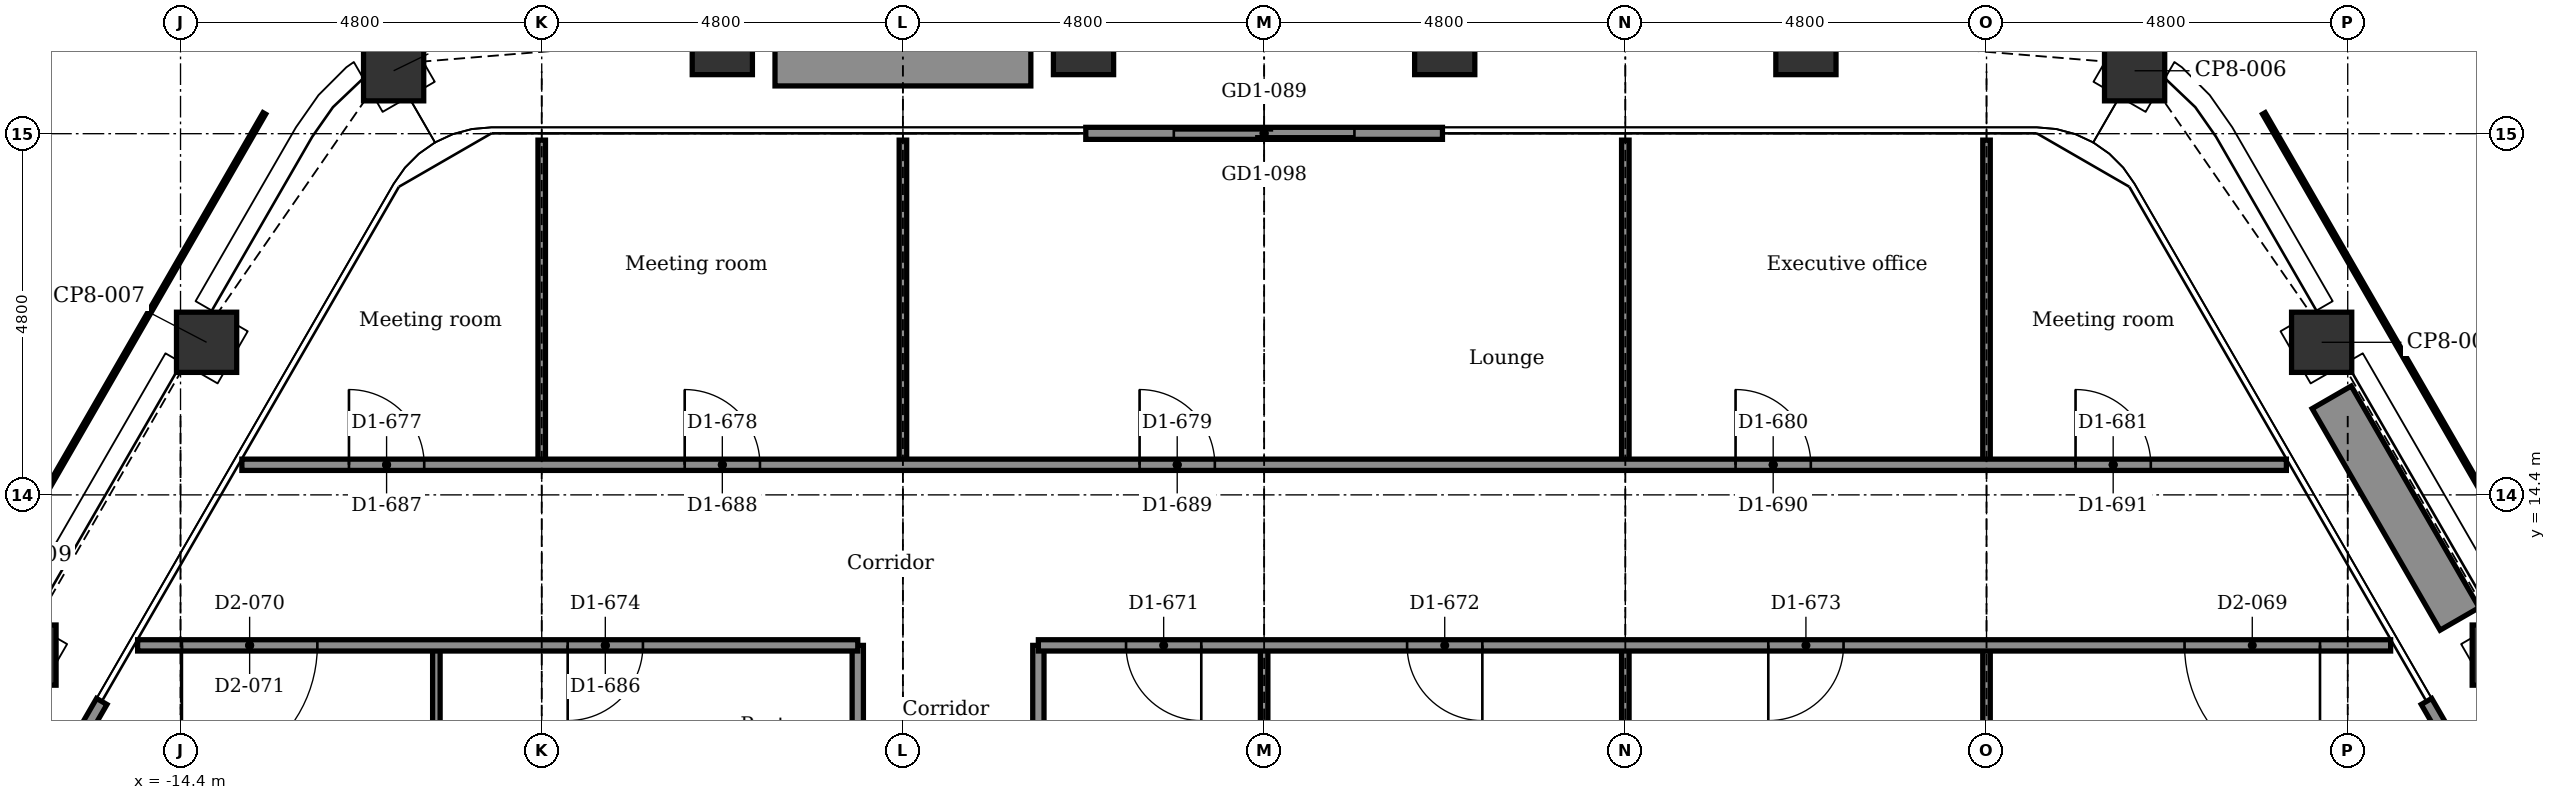
"""IFC4 building model, lengths in metres.
Left out: names, types, materials, properties, quantities, classifications, styles, units other than length and angle.
Written with IfcOpenShell. Run it as: python <this file> out.ifc"""

import sys

from ifc_helpers import new_model, si_unit, direction, frame, frame_2d, origin, origin_2d, place, context, subcontext, project, spatial, rectangle, extrude, element, fill, save


model = new_model("IFC4")
c1 = context("Model", 3, precision=1e-05, world=origin(), true_north=direction((0.0, 1.0)))
c2 = subcontext(c1, "Body", "Model", "MODEL_VIEW")
j1 = project(units=[si_unit("LENGTHUNIT", "METRE"), si_unit("PLANEANGLEUNIT", "RADIAN")], contexts=[c1])
p1 = place(None, origin())
s1 = spatial("IfcSite", under=j1, at=p1, CompositionType="ELEMENT")
p2 = place(p1, origin())
s2 = spatial("IfcBuilding", under=s1, at=p2, CompositionType="ELEMENT")
p3 = place(p2, frame((0.0, 0.0, 242.3)))
s3 = spatial("IfcBuildingStorey", under=s2, at=p3, CompositionType="ELEMENT", Elevation=242.3)
for number, where, z_axis, x_axis in (
    (1, (-11.568, 20.036, -0.15), (0.0, 0.0, 1.0), (0.866, 0.5, 0.0)),
    (2, (-7.2, 20.385, -0.15), (0.0, 0.0, 1.0), (1.0, 0.0, 0.0)),
    (3, (-2.4, 20.385, -0.15), (0.0, 0.0, 1.0), (1.0, 0.0, 0.0)),
    (4, (2.4, 20.385, -0.15), (0.0, 0.0, 1.0), (1.0, 0.0, 0.0)),
    (5, (7.2, 20.385, -0.15), (0.0, 0.0, 1.0), (1.0, 0.0, 0.0)),
    (6, (11.568, 20.036, -0.15), (0.0, 0.0, 1.0), (0.5, 0.866, 0.0)),
    (7, (14.054, 16.428, -0.15), (0.0, 0.0, 1.0), (0.866, 0.5, 0.0)),
    (8, (16.454, 12.271, -0.15), (0.0, 0.0, 1.0), (0.866, 0.5, 0.0)),
    (9, (-16.454, 12.271, -0.15), (0.0, 0.0, 1.0), (0.5, 0.866, 0.0)),
    (10, (-14.054, 16.428, -0.15), (0.0, 0.0, 1.0), (0.5, 0.866, 0.0)),
):
    element("IfcColumn", number, at=place(p3, frame(where, z_axis=z_axis, x_axis=x_axis)), inside=s3, PredefinedType="COLUMN", context=c2, shape_type="SweptSolid", body=[
        extrude(rectangle(XDim=0.8, YDim=0.8, at=origin_2d()), origin(), (0.0, 0.0, 1.0), 3.9),
    ])
p4 = place(p3, frame((-2.37, 19.205, 0.0), z_axis=(0.0, 0.0, 1.0), x_axis=(1.0, 0.0, 0.0)))
e11 = element("IfcWall", 11, at=p4, inside=s3, PredefinedType="PARTITIONING", context=c2, shape_type="SweptSolid", body=[
    extrude(rectangle(XDim=4.74, YDim=0.16, at=frame_2d((2.37, 0.0))), origin(), (0.0, 0.0, 1.0), 3.75),
])
p5 = place(p4, frame((1.17, 0.0, 0.0)))
e12 = element("IfcOpeningElement", 12, at=p5, cuts=e11, PredefinedType="OPENING", context=c2, shape_type="SweptSolid", body=[
    extrude(rectangle(XDim=2.4, YDim=2.4, at=frame_2d((1.2, 1.2))), frame((0.0, 0.09, 0.0), z_axis=(0.0, -1.0, 0.0), x_axis=(1.0, 0.0, 0.0)), (0.0, 0.0, 1.0), 0.18),
])
p6 = place(p3, frame((15.447, 11.655, 0.0), z_axis=(0.0, 0.0, 1.0), x_axis=(0.499978080042, -0.866038058908, 0.0)))
e13 = element("IfcWall", 13, at=p6, inside=s3, PredefinedType="PARTITIONING", context=c2, shape_type="SweptSolid", body=[
    extrude(rectangle(XDim=4.74, YDim=0.16, at=frame_2d((2.37, 0.0))), origin(), (0.0, 0.0, 1.0), 3.75),
])
p7 = place(p6, frame((1.17, 0.0, 0.0)))
e14 = element("IfcOpeningElement", 14, at=p7, cuts=e13, PredefinedType="OPENING", context=c2, shape_type="SweptSolid", body=[
    extrude(rectangle(XDim=2.4, YDim=2.4, at=frame_2d((1.2, 1.2))), frame((0.0, 0.09, 0.0), z_axis=(0.0, -1.0, 0.0), x_axis=(1.0, 0.0, 0.0)), (0.0, 0.0, 1.0), 0.18),
])
p8 = place(p3, frame((-17.817, 7.55, 0.0), z_axis=(0.0, 0.0, 1.0), x_axis=(0.499978080042, 0.866038058908, 0.0)))
e15 = element("IfcWall", 15, at=p8, inside=s3, PredefinedType="PARTITIONING", context=c2, shape_type="SweptSolid", body=[
    extrude(rectangle(XDim=4.74, YDim=0.16, at=frame_2d((2.37, 0.0))), origin(), (0.0, 0.0, 1.0), 3.75),
])
p9 = place(p8, frame((1.17, 0.0, 0.0)))
e16 = element("IfcOpeningElement", 16, at=p9, cuts=e15, PredefinedType="OPENING", context=c2, shape_type="SweptSolid", body=[
    extrude(rectangle(XDim=2.4, YDim=2.4, at=frame_2d((1.2, 1.2))), frame((0.0, 0.09, 0.0), z_axis=(0.0, -1.0, 0.0), x_axis=(1.0, 0.0, 0.0)), (0.0, 0.0, 1.0), 0.18),
])
p10 = place(p3, frame((-6.5, 20.135, 0.0), z_axis=(0.0, 0.0, 1.0), x_axis=(1.0, 0.0, 0.0)))
e17 = element("IfcWall", 17, at=p10, inside=s3, PredefinedType="USERDEFINED", context=c2, shape_type="SweptSolid", body=[
    extrude(rectangle(XDim=3.4, YDim=0.6, at=frame_2d((1.7, 0.0))), origin(), (0.0, 0.0, 1.0), 0.7),
])
p11 = place(p3, frame((14.187, 15.697, 0.0), z_axis=(0.0, 0.0, 1.0), x_axis=(0.499977295307, -0.866038511948, 0.0)))
e18 = element("IfcWall", 18, at=p11, inside=s3, PredefinedType="USERDEFINED", context=c2, shape_type="SweptSolid", body=[
    extrude(rectangle(XDim=3.4, YDim=0.6, at=frame_2d((1.7, 0.0))), origin(), (0.0, 0.0, 1.0), 0.7),
])
p12 = place(p3, frame((9.6, 9.925, 0.0), z_axis=(0.0, 0.0, 1.0), x_axis=(0.0, 1.0, 0.0)))
e19 = element("IfcWall", 19, at=p12, inside=s3, PredefinedType="PARTITIONING", context=c2, shape_type="SweptSolid", body=[
    extrude(rectangle(XDim=2.475, YDim=0.1, at=frame_2d((1.237, 0.0))), origin(), (0.0, 0.0, 1.0), 3.217),
])
p13 = place(p3, frame((9.6, 14.8, 0.0), z_axis=(0.0, 0.0, 1.0), x_axis=(0.0, 1.0, 0.0)))
e20 = element("IfcWall", 20, at=p13, inside=s3, PredefinedType="PARTITIONING", context=c2, shape_type="SweptSolid", body=[
    extrude(rectangle(XDim=4.314, YDim=0.1, at=frame_2d((2.157, 0.0))), origin(), (0.0, 0.0, 1.0), 3.217),
])
p14 = place(p3, frame((4.8, 9.875, 0.0), z_axis=(0.0, 0.0, 1.0), x_axis=(0.0, 1.0, 0.0)))
e21 = element("IfcWall", 21, at=p14, inside=s3, PredefinedType="PARTITIONING", context=c2, shape_type="SweptSolid", body=[
    extrude(rectangle(XDim=2.525, YDim=0.1, at=frame_2d((1.262, 0.0))), origin(), (0.0, 0.0, 1.0), 3.217),
])
p15 = place(p3, frame((4.8, 14.8, 0.0), z_axis=(0.0, 0.0, 1.0), x_axis=(0.0, 1.0, 0.0)))
e22 = element("IfcWall", 22, at=p15, inside=s3, PredefinedType="PARTITIONING", context=c2, shape_type="SweptSolid", body=[
    extrude(rectangle(XDim=4.314, YDim=0.1, at=frame_2d((2.157, 0.0))), origin(), (0.0, 0.0, 1.0), 3.217),
])
p16 = place(p3, frame((0.0, 9.875, 0.0), z_axis=(0.0, 0.0, 1.0), x_axis=(0.0, 1.0, 0.0)))
e23 = element("IfcWall", 23, at=p16, inside=s3, PredefinedType="PARTITIONING", context=c2, shape_type="SweptSolid", body=[
    extrude(rectangle(XDim=2.525, YDim=0.1, at=frame_2d((1.262, 0.0))), origin(), (0.0, 0.0, 1.0), 3.217),
])
p17 = place(p3, frame((-3.0, 9.875, 0.0), z_axis=(0.0, 0.0, 1.0), x_axis=(0.0, 1.0, 0.0)))
e24 = element("IfcWall", 24, at=p17, inside=s3, PredefinedType="PARTITIONING", context=c2, shape_type="SweptSolid", body=[
    extrude(rectangle(XDim=2.525, YDim=0.15, at=frame_2d((1.262, 0.0))), origin(), (0.0, 0.0, 1.0), 3.75),
])
p18 = place(p3, frame((-4.8, 14.8, 0.0), z_axis=(0.0, 0.0, 1.0), x_axis=(0.0, 1.0, 0.0)))
e25 = element("IfcWall", 25, at=p18, inside=s3, PredefinedType="PARTITIONING", context=c2, shape_type="SweptSolid", body=[
    extrude(rectangle(XDim=4.314, YDim=0.1, at=frame_2d((2.157, 0.0))), origin(), (0.0, 0.0, 1.0), 3.217),
])
p19 = place(p3, frame((-5.4, 10.15, 0.0), z_axis=(0.0, 0.0, 1.0), x_axis=(0.0, 1.0, 0.0)))
e26 = element("IfcWall", 26, at=p19, inside=s3, PredefinedType="PARTITIONING", context=c2, shape_type="SweptSolid", body=[
    extrude(rectangle(XDim=2.25, YDim=0.15, at=frame_2d((1.125, 0.0))), origin(), (0.0, 0.0, 1.0), 3.75),
])
p20 = place(p3, frame((-9.6, 14.8, 0.0), z_axis=(0.0, 0.0, 1.0), x_axis=(0.0, 1.0, 0.0)))
e27 = element("IfcWall", 27, at=p20, inside=s3, PredefinedType="PARTITIONING", context=c2, shape_type="SweptSolid", body=[
    extrude(rectangle(XDim=4.314, YDim=0.1, at=frame_2d((2.157, 0.0))), origin(), (0.0, 0.0, 1.0), 3.293),
])
p21 = place(p3, frame((-11.0, 10.0, 0.0), z_axis=(0.0, 0.0, 1.0), x_axis=(0.0, 1.0, 0.0)))
e28 = element("IfcWall", 28, at=p21, inside=s3, PredefinedType="PARTITIONING", context=c2, shape_type="SweptSolid", body=[
    extrude(rectangle(XDim=2.4, YDim=0.1, at=frame_2d((1.2, 0.0))), origin(), (0.0, 0.0, 1.0), 3.75),
])
p22 = place(p3, frame((-14.97, 12.4, 0.0), z_axis=(0.0, 0.0, 1.0), x_axis=(1.0, 0.0, 0.0)))
e29 = element("IfcWall", 29, at=p22, inside=s3, PredefinedType="PARTITIONING", context=c2, shape_type="SweptSolid", body=[
    extrude(rectangle(XDim=9.57, YDim=0.15, at=frame_2d((4.785, 0.0))), origin(), (0.0, 0.0, 1.0), 3.75),
])
p23 = place(p22, frame((5.715, 0.0, 0.0)))
e30 = element("IfcOpeningElement", 30, at=p23, cuts=e29, PredefinedType="OPENING", context=c2, shape_type="SweptSolid", body=[
    extrude(rectangle(XDim=1.0, YDim=2.1, at=frame_2d((0.5, 1.05))), frame((0.0, 0.085, 0.0), z_axis=(0.0, -1.0, 0.0), x_axis=(1.0, 0.0, 0.0)), (0.0, 0.0, 1.0), 0.17),
])
p24 = place(p22, frame((0.589, 0.0, 0.0)))
e31 = element("IfcOpeningElement", 31, at=p24, cuts=e29, PredefinedType="OPENING", context=c2, shape_type="SweptSolid", body=[
    extrude(rectangle(XDim=1.8, YDim=2.1, at=frame_2d((0.9, 1.05))), frame((0.0, 0.085, 0.0), z_axis=(0.0, -1.0, 0.0), x_axis=(1.0, 0.0, 0.0)), (0.0, 0.0, 1.0), 0.17),
])
p25 = place(p3, frame((-3.0, 12.4, 0.0), z_axis=(0.0, 0.0, 1.0), x_axis=(1.0, 0.0, 0.0)))
e32 = element("IfcWall", 32, at=p25, inside=s3, PredefinedType="PARTITIONING", context=c2, shape_type="SweptSolid", body=[
    extrude(rectangle(XDim=17.97, YDim=0.15, at=frame_2d((8.985, 0.0))), origin(), (0.0, 0.0, 1.0), 3.75),
])
p26 = place(p25, frame((1.165, 0.0, 0.0)))
e33 = element("IfcOpeningElement", 33, at=p26, cuts=e32, PredefinedType="OPENING", context=c2, shape_type="SweptSolid", body=[
    extrude(rectangle(XDim=1.0, YDim=2.1, at=frame_2d((0.5, 1.05))), frame((0.0, 0.085, 0.0), z_axis=(0.0, -1.0, 0.0), x_axis=(1.0, 0.0, 0.0)), (0.0, 0.0, 1.0), 0.17),
])
p27 = place(p25, frame((4.9, 0.0, 0.0)))
e34 = element("IfcOpeningElement", 34, at=p27, cuts=e32, PredefinedType="OPENING", context=c2, shape_type="SweptSolid", body=[
    extrude(rectangle(XDim=1.0, YDim=2.1, at=frame_2d((0.5, 1.05))), frame((0.0, 0.085, 0.0), z_axis=(0.0, -1.0, 0.0), x_axis=(1.0, 0.0, 0.0)), (0.0, 0.0, 1.0), 0.17),
])
p28 = place(p25, frame((9.7, 0.0, 0.0)))
e35 = element("IfcOpeningElement", 35, at=p28, cuts=e32, PredefinedType="OPENING", context=c2, shape_type="SweptSolid", body=[
    extrude(rectangle(XDim=1.0, YDim=2.1, at=frame_2d((0.5, 1.05))), frame((0.0, 0.085, 0.0), z_axis=(0.0, -1.0, 0.0), x_axis=(1.0, 0.0, 0.0)), (0.0, 0.0, 1.0), 0.17),
])
p29 = place(p25, frame((15.232, 0.0, 0.0)))
e36 = element("IfcOpeningElement", 36, at=p29, cuts=e32, PredefinedType="OPENING", context=c2, shape_type="SweptSolid", body=[
    extrude(rectangle(XDim=1.8, YDim=2.1, at=frame_2d((0.9, 1.05))), frame((0.0, 0.085, 0.0), z_axis=(0.0, -1.0, 0.0), x_axis=(1.0, 0.0, 0.0)), (0.0, 0.0, 1.0), 0.17),
])
p30 = place(p3, frame((-13.585, 14.8, 0.0), z_axis=(0.0, 0.0, 1.0), x_axis=(1.0, 0.0, 0.0)))
e37 = element("IfcWall", 37, at=p30, inside=s3, PredefinedType="PARTITIONING", context=c2, shape_type="SweptSolid", body=[
    extrude(rectangle(XDim=27.169, YDim=0.15, at=frame_2d((13.585, 0.0))), origin(), (0.0, 0.0, 1.0), 3.75),
])
p31 = place(p30, frame((1.423, 0.0, 0.0)))
e38 = element("IfcOpeningElement", 38, at=p31, cuts=e37, PredefinedType="OPENING", context=c2, shape_type="SweptSolid", body=[
    extrude(rectangle(XDim=1.0, YDim=2.1, at=frame_2d((0.5, 1.05))), frame((0.0, 0.085, 0.0), z_axis=(0.0, -1.0, 0.0), x_axis=(1.0, 0.0, 0.0)), (0.0, 0.0, 1.0), 0.17),
])
p32 = place(p30, frame((5.885, 0.0, 0.0)))
e39 = element("IfcOpeningElement", 39, at=p32, cuts=e37, PredefinedType="OPENING", context=c2, shape_type="SweptSolid", body=[
    extrude(rectangle(XDim=1.0, YDim=2.1, at=frame_2d((0.5, 1.05))), frame((0.0, 0.085, 0.0), z_axis=(0.0, -1.0, 0.0), x_axis=(1.0, 0.0, 0.0)), (0.0, 0.0, 1.0), 0.17),
])
p33 = place(p30, frame((11.93, 0.0, 0.0)))
e40 = element("IfcOpeningElement", 40, at=p33, cuts=e37, PredefinedType="OPENING", context=c2, shape_type="SweptSolid", body=[
    extrude(rectangle(XDim=1.0, YDim=2.1, at=frame_2d((0.5, 1.05))), frame((0.0, 0.085, 0.0), z_axis=(0.0, -1.0, 0.0), x_axis=(1.0, 0.0, 0.0)), (0.0, 0.0, 1.0), 0.17),
])
p34 = place(p30, frame((19.85, 0.0, 0.0)))
e41 = element("IfcOpeningElement", 41, at=p34, cuts=e37, PredefinedType="OPENING", context=c2, shape_type="SweptSolid", body=[
    extrude(rectangle(XDim=1.0, YDim=2.1, at=frame_2d((0.5, 1.05))), frame((0.0, 0.085, 0.0), z_axis=(0.0, -1.0, 0.0), x_axis=(1.0, 0.0, 0.0)), (0.0, 0.0, 1.0), 0.17),
])
p35 = place(p30, frame((24.368, 0.0, 0.0)))
e42 = element("IfcOpeningElement", 42, at=p35, cuts=e37, PredefinedType="OPENING", context=c2, shape_type="SweptSolid", body=[
    extrude(rectangle(XDim=1.0, YDim=2.1, at=frame_2d((0.5, 1.05))), frame((0.0, 0.085, 0.0), z_axis=(0.0, -1.0, 0.0), x_axis=(1.0, 0.0, 0.0)), (0.0, 0.0, 1.0), 0.17),
])
p36 = place(p5, origin())
e43 = element("IfcDoor", 43, at=p36, inside=s3, OperationType="DOUBLE_DOOR_SLIDING", PredefinedType="DOOR", context=c2, shape_type="SweptSolid", body=[
    extrude(rectangle(XDim=2.4, YDim=2.4, at=frame_2d((1.2, 1.2))), frame((0.0, 0.025, 0.0), z_axis=(0.0, -1.0, 0.0), x_axis=(1.0, 0.0, 0.0)), (0.0, 0.0, 1.0), 0.05),
])
fill(e12, e43)
p37 = place(p26, frame((1.0, 0.0, 0.0), z_axis=(0.0, 0.0, 1.0), x_axis=(-1.0, 0.0, 0.0)))
e44 = element("IfcDoor", 44, at=p37, inside=s3, OperationType="SINGLE_SWING_RIGHT", PredefinedType="DOOR", context=c2, shape_type="SweptSolid", body=[
    extrude(rectangle(XDim=1.0, YDim=2.1, at=frame_2d((0.5, 1.05))), frame((0.0, 0.025, 0.0), z_axis=(0.0, -1.0, 0.0), x_axis=(1.0, 0.0, 0.0)), (0.0, 0.0, 1.0), 0.05),
])
fill(e33, e44)
p38 = place(p27, frame((1.0, 0.0, 0.0), z_axis=(0.0, 0.0, 1.0), x_axis=(-1.0, 0.0, 0.0)))
e45 = element("IfcDoor", 45, at=p38, inside=s3, OperationType="SINGLE_SWING_RIGHT", PredefinedType="DOOR", context=c2, shape_type="SweptSolid", body=[
    extrude(rectangle(XDim=1.0, YDim=2.1, at=frame_2d((0.5, 1.05))), frame((0.0, 0.025, 0.0), z_axis=(0.0, -1.0, 0.0), x_axis=(1.0, 0.0, 0.0)), (0.0, 0.0, 1.0), 0.05),
])
fill(e34, e45)
p39 = place(p28, frame((1.0, 0.0, 0.0), z_axis=(0.0, 0.0, 1.0), x_axis=(-1.0, 0.0, 0.0)))
e46 = element("IfcDoor", 46, at=p39, inside=s3, OperationType="SINGLE_SWING_LEFT", PredefinedType="DOOR", context=c2, shape_type="SweptSolid", body=[
    extrude(rectangle(XDim=1.0, YDim=2.1, at=frame_2d((0.5, 1.05))), frame((0.0, 0.025, 0.0), z_axis=(0.0, -1.0, 0.0), x_axis=(1.0, 0.0, 0.0)), (0.0, 0.0, 1.0), 0.05),
])
fill(e35, e46)
p40 = place(p23, frame((1.0, 0.0, 0.0), z_axis=(0.0, 0.0, 1.0), x_axis=(-1.0, 0.0, 0.0)))
e47 = element("IfcDoor", 47, at=p40, inside=s3, OperationType="SINGLE_SWING_LEFT", PredefinedType="DOOR", context=c2, shape_type="SweptSolid", body=[
    extrude(rectangle(XDim=1.0, YDim=2.1, at=frame_2d((0.5, 1.05))), frame((0.0, 0.025, 0.0), z_axis=(0.0, -1.0, 0.0), x_axis=(1.0, 0.0, 0.0)), (0.0, 0.0, 1.0), 0.05),
])
fill(e30, e47)
p41 = place(p31, origin())
e48 = element("IfcDoor", 48, at=p41, inside=s3, OperationType="SINGLE_SWING_LEFT", PredefinedType="DOOR", context=c2, shape_type="SweptSolid", body=[
    extrude(rectangle(XDim=1.0, YDim=2.1, at=frame_2d((0.5, 1.05))), frame((0.0, 0.025, 0.0), z_axis=(0.0, -1.0, 0.0), x_axis=(1.0, 0.0, 0.0)), (0.0, 0.0, 1.0), 0.05),
])
fill(e38, e48)
p42 = place(p32, origin())
e49 = element("IfcDoor", 49, at=p42, inside=s3, OperationType="SINGLE_SWING_LEFT", PredefinedType="DOOR", context=c2, shape_type="SweptSolid", body=[
    extrude(rectangle(XDim=1.0, YDim=2.1, at=frame_2d((0.5, 1.05))), frame((0.0, 0.025, 0.0), z_axis=(0.0, -1.0, 0.0), x_axis=(1.0, 0.0, 0.0)), (0.0, 0.0, 1.0), 0.05),
])
fill(e39, e49)
p43 = place(p33, origin())
e50 = element("IfcDoor", 50, at=p43, inside=s3, OperationType="SINGLE_SWING_LEFT", PredefinedType="DOOR", context=c2, shape_type="SweptSolid", body=[
    extrude(rectangle(XDim=1.0, YDim=2.1, at=frame_2d((0.5, 1.05))), frame((0.0, 0.025, 0.0), z_axis=(0.0, -1.0, 0.0), x_axis=(1.0, 0.0, 0.0)), (0.0, 0.0, 1.0), 0.05),
])
fill(e40, e50)
p44 = place(p34, origin())
e51 = element("IfcDoor", 51, at=p44, inside=s3, OperationType="SINGLE_SWING_LEFT", PredefinedType="DOOR", context=c2, shape_type="SweptSolid", body=[
    extrude(rectangle(XDim=1.0, YDim=2.1, at=frame_2d((0.5, 1.05))), frame((0.0, 0.025, 0.0), z_axis=(0.0, -1.0, 0.0), x_axis=(1.0, 0.0, 0.0)), (0.0, 0.0, 1.0), 0.05),
])
fill(e41, e51)
p45 = place(p35, origin())
e52 = element("IfcDoor", 52, at=p45, inside=s3, OperationType="SINGLE_SWING_LEFT", PredefinedType="DOOR", context=c2, shape_type="SweptSolid", body=[
    extrude(rectangle(XDim=1.0, YDim=2.1, at=frame_2d((0.5, 1.05))), frame((0.0, 0.025, 0.0), z_axis=(0.0, -1.0, 0.0), x_axis=(1.0, 0.0, 0.0)), (0.0, 0.0, 1.0), 0.05),
])
fill(e42, e52)
p46 = place(p29, frame((1.8, 0.0, 0.0), z_axis=(0.0, 0.0, 1.0), x_axis=(-1.0, 0.0, 0.0)))
e53 = element("IfcDoor", 53, at=p46, inside=s3, OperationType="SINGLE_SWING_RIGHT", PredefinedType="DOOR", context=c2, shape_type="SweptSolid", body=[
    extrude(rectangle(XDim=1.8, YDim=2.1, at=frame_2d((0.9, 1.05))), frame((0.0, 0.025, 0.0), z_axis=(0.0, -1.0, 0.0), x_axis=(1.0, 0.0, 0.0)), (0.0, 0.0, 1.0), 0.05),
])
fill(e36, e53)
p47 = place(p24, frame((1.8, 0.0, 0.0), z_axis=(0.0, 0.0, 1.0), x_axis=(-1.0, 0.0, 0.0)))
e54 = element("IfcDoor", 54, at=p47, inside=s3, OperationType="SINGLE_SWING_LEFT", PredefinedType="DOOR", context=c2, shape_type="SweptSolid", body=[
    extrude(rectangle(XDim=1.8, YDim=2.1, at=frame_2d((0.9, 1.05))), frame((0.0, 0.025, 0.0), z_axis=(0.0, -1.0, 0.0), x_axis=(1.0, 0.0, 0.0)), (0.0, 0.0, 1.0), 0.05),
])
fill(e31, e54)
save(model, sys.argv[1])
